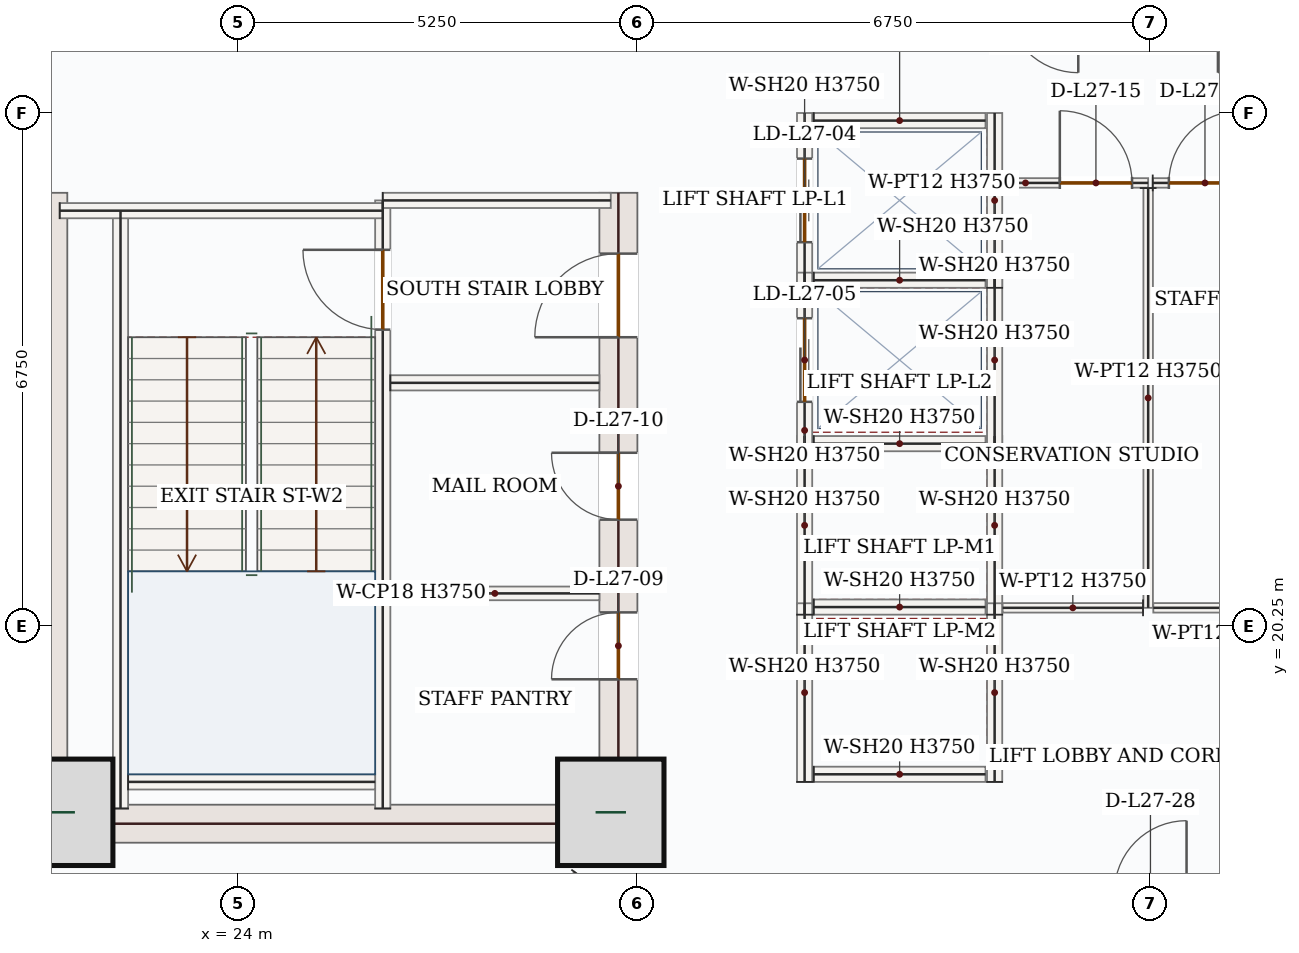
"""IFC4 building model, lengths in metres.
Left out: names, types, materials, properties, quantities, classifications, styles, units other than length and angle.
Written with IfcOpenShell. Run it as: python <this file> out.ifc"""

import sys

from ifc_helpers import new_model, si_unit, direction, frame, frame_2d, origin, origin_2d, place, context, subcontext, project, spatial, rectangle, extrude, source, transform, mapped, element, fill, save


model = new_model("IFC4")
c1 = context("Model", 3, precision=1e-05, world=origin(), true_north=direction((0.0, 1.0)))
c2 = subcontext(c1, "Body", "Model", "MODEL_VIEW")
j1 = project(units=[si_unit("LENGTHUNIT", "METRE"), si_unit("PLANEANGLEUNIT", "RADIAN")], contexts=[c1])
p1 = place(None, origin())
s1 = spatial("IfcSite", under=j1, at=p1, CompositionType="ELEMENT")
p2 = place(p1, origin())
s2 = spatial("IfcBuilding", under=s1, at=p2, CompositionType="ELEMENT")
p3 = place(p2, frame((0.0, 0.0, 121.5)))
s3 = spatial("IfcBuildingStorey", under=s2, at=p3, CompositionType="ELEMENT", Elevation=121.5)
m1 = source(origin(), c2, "Body", "SweptSolid", [
    extrude(rectangle(XDim=8.55, YDim=0.5, at=frame_2d((4.275, 0.0))), origin(), (0.0, 0.0, 1.0), 3.75),
])
p4 = place(p3, frame((21.5, 17.4, 0.0), z_axis=(0.0, 0.0, 1.0), x_axis=(0.0, 1.0, 0.0)))
e1 = element("IfcWall", 1, at=p4, inside=s3, PredefinedType="SHEAR", context=c2, shape_type="MappedRepresentation", body=[
    mapped(m1, transform((0.0, 0.0, 0.0), x_axis=(1.0, 0.0, 0.0), y_axis=(0.0, 1.0, 0.0), z_axis=(0.0, 0.0, 1.0), scale=1.0)),
])
p5 = place(p3, frame((29.0, 17.4, 0.0), z_axis=(0.0, 0.0, 1.0), x_axis=(0.0, 1.0, 0.0)))
e2 = element("IfcWall", 2, at=p5, inside=s3, PredefinedType="SHEAR", context=c2, shape_type="SweptSolid", body=[
    extrude(rectangle(XDim=8.55, YDim=0.5, at=frame_2d((4.275, 0.0))), origin(), (0.0, 0.0, 1.0), 3.75),
])
p6 = place(p5, frame((6.65, 0.0, 0.0)))
e3 = element("IfcOpeningElement", 3, at=p6, cuts=e2, PredefinedType="OPENING", context=c2, shape_type="SweptSolid", body=[
    extrude(rectangle(XDim=1.1, YDim=2.2, at=frame_2d((0.55, 1.1))), frame((0.0, 0.26, 0.0), z_axis=(0.0, -1.0, 0.0), x_axis=(1.0, 0.0, 0.0)), (0.0, 0.0, 1.0), 0.52),
])
p7 = place(p5, frame((2.15, 0.0, 0.0)))
e4 = element("IfcOpeningElement", 4, at=p7, cuts=e2, PredefinedType="OPENING", context=c2, shape_type="SweptSolid", body=[
    extrude(rectangle(XDim=0.88, YDim=2.1, at=frame_2d((0.44, 1.05))), frame((0.0, 0.26, 0.0), z_axis=(0.0, -1.0, 0.0), x_axis=(1.0, 0.0, 0.0)), (0.0, 0.0, 1.0), 0.52),
])
p8 = place(p5, frame((4.25, 0.0, 0.0)))
e5 = element("IfcOpeningElement", 5, at=p8, cuts=e2, PredefinedType="OPENING", context=c2, shape_type="SweptSolid", body=[
    extrude(rectangle(XDim=0.88, YDim=2.1, at=frame_2d((0.44, 1.05))), frame((0.0, 0.26, 0.0), z_axis=(0.0, -1.0, 0.0), x_axis=(1.0, 0.0, 0.0)), (0.0, 0.0, 1.0), 0.52),
])
m2 = source(origin(), c2, "Body", "SweptSolid", [
    extrude(rectangle(XDim=7.0, YDim=0.5, at=frame_2d((3.5, 0.0))), origin(), (0.0, 0.0, 1.0), 3.75),
])
p9 = place(p3, frame((21.75, 17.65, 0.0), z_axis=(0.0, 0.0, 1.0), x_axis=(1.0, 0.0, 0.0)))
e6 = element("IfcWall", 6, at=p9, inside=s3, PredefinedType="SHEAR", context=c2, shape_type="MappedRepresentation", body=[
    mapped(m2, transform((0.0, 0.0, 0.0), x_axis=(1.0, 0.0, 0.0), y_axis=(0.0, 1.0, 0.0), z_axis=(0.0, 0.0, 1.0), scale=1.0)),
])
m3 = source(origin(), c2, "Body", "SweptSolid", [
    extrude(rectangle(XDim=1.4, YDim=1.4, at=origin_2d()), origin(), (0.0, 0.0, 1.0), 4.2),
])
for number, where, z_axis, x_axis in (
    (7, (21.65, 17.8, 0.0), (0.0, 0.0, 1.0), (1.0, 0.0, 0.0)),
    (8, (28.9, 17.8, 0.0), (0.0, 0.0, 1.0), (1.0, 0.0, 0.0)),
):
    element("IfcColumn", number, at=place(p3, frame(where, z_axis=z_axis, x_axis=x_axis)), inside=s3, PredefinedType="COLUMN", context=c2, shape_type="MappedRepresentation", body=[
        mapped(m3, transform((0.0, 0.0, 0.0), x_axis=(1.0, 0.0, 0.0), y_axis=(0.0, 1.0, 0.0), z_axis=(0.0, 0.0, 1.0), scale=1.0)),
    ])
p10 = place(p3, frame((22.658, 14.74, 0.0), z_axis=(0.0, 0.0, 1.0), x_axis=(-0.707106781187, 0.707106781187, 0.0)))
e9 = element("IfcWall", 9, at=p10, inside=s3, PredefinedType="SOLIDWALL", context=c2, shape_type="SweptSolid", body=[
    extrude(rectangle(XDim=4.545, YDim=0.32, at=frame_2d((2.272, 0.0))), origin(), (0.0, 0.0, 1.0), 3.75),
])
p11 = place(p10, frame((1.073, 0.0, 0.85)))
e10 = element("IfcOpeningElement", 10, at=p11, cuts=e9, PredefinedType="OPENING", context=c2, shape_type="SweptSolid", body=[
    extrude(rectangle(XDim=2.4, YDim=1.8, at=frame_2d((1.2, 0.9))), frame((0.0, 0.17, 0.0), z_axis=(0.0, -1.0, 0.0), x_axis=(1.0, 0.0, 0.0)), (0.0, 0.0, 1.0), 0.34),
])
m4 = source(origin(), c2, "Body", "SweptSolid", [
    extrude(rectangle(XDim=7.87, YDim=0.2, at=frame_2d((3.935, 0.0))), origin(), (0.0, 0.0, 1.0), 3.75),
])
p12 = place(p3, frame((22.45, 17.85, 0.0), z_axis=(0.0, 0.0, 1.0), x_axis=(0.0, 1.0, 0.0)))
e11 = element("IfcWall", 11, at=p12, inside=s3, PredefinedType="SOLIDWALL", context=c2, shape_type="MappedRepresentation", body=[
    mapped(m4, transform((0.0, 0.0, 0.0), x_axis=(1.0, 0.0, 0.0), y_axis=(0.0, 1.0, 0.0), z_axis=(0.0, 0.0, 1.0), scale=1.0)),
])
p13 = place(p3, frame((25.9, 17.85, 0.0), z_axis=(0.0, 0.0, 1.0), x_axis=(0.0, 1.0, 0.0)))
e12 = element("IfcWall", 12, at=p13, inside=s3, PredefinedType="SOLIDWALL", context=c2, shape_type="SweptSolid", body=[
    extrude(rectangle(XDim=8.0, YDim=0.2, at=frame_2d((4.0, 0.0))), origin(), (0.0, 0.0, 1.0), 3.75),
])
p14 = place(p13, frame((6.3, 0.0, 0.0)))
e13 = element("IfcOpeningElement", 13, at=p14, cuts=e12, PredefinedType="OPENING", context=c2, shape_type="SweptSolid", body=[
    extrude(rectangle(XDim=1.05, YDim=2.15, at=frame_2d((0.525, 1.075))), frame((0.0, 0.11, 0.0), z_axis=(0.0, -1.0, 0.0), x_axis=(1.0, 0.0, 0.0)), (0.0, 0.0, 1.0), 0.22),
])
m5 = source(origin(), c2, "Body", "SweptSolid", [
    extrude(rectangle(XDim=4.25, YDim=0.2, at=frame_2d((2.125, 0.0))), origin(), (0.0, 0.0, 1.0), 3.75),
])
p15 = place(p3, frame((21.65, 25.715, 0.0), z_axis=(0.0, 0.0, 1.0), x_axis=(1.0, 0.0, 0.0)))
e14 = element("IfcWall", 14, at=p15, inside=s3, PredefinedType="SOLIDWALL", context=c2, shape_type="MappedRepresentation", body=[
    mapped(m5, transform((0.0, 0.0, 0.0), x_axis=(1.0, 0.0, 0.0), y_axis=(0.0, 1.0, 0.0), z_axis=(0.0, 0.0, 1.0), scale=1.0)),
])
m6 = source(origin(), c2, "Body", "SweptSolid", [
    extrude(rectangle(XDim=3.0, YDim=0.2, at=frame_2d((1.5, 0.0))), origin(), (0.0, 0.0, 1.0), 3.75),
])
p16 = place(p3, frame((25.9, 25.85, 0.0), z_axis=(0.0, 0.0, 1.0), x_axis=(1.0, 0.0, 0.0)))
e15 = element("IfcWall", 15, at=p16, inside=s3, PredefinedType="SOLIDWALL", context=c2, shape_type="MappedRepresentation", body=[
    mapped(m6, transform((0.0, 0.0, 0.0), x_axis=(1.0, 0.0, 0.0), y_axis=(0.0, 1.0, 0.0), z_axis=(0.0, 0.0, 1.0), scale=1.0)),
])
m7 = source(origin(), c2, "Body", "SweptSolid", [
    extrude(rectangle(XDim=3.25, YDim=0.2, at=frame_2d((1.625, 0.0))), origin(), (0.0, 0.0, 1.0), 3.75),
])
p17 = place(p3, frame((22.55, 18.2, 0.0), z_axis=(0.0, 0.0, 1.0), x_axis=(1.0, 0.0, 0.0)))
e16 = element("IfcWall", 16, at=p17, inside=s3, PredefinedType="SOLIDWALL", context=c2, shape_type="MappedRepresentation", body=[
    mapped(m7, transform((0.0, 0.0, 0.0), x_axis=(1.0, 0.0, 0.0), y_axis=(0.0, 1.0, 0.0), z_axis=(0.0, 0.0, 1.0), scale=1.0)),
])
m8 = source(origin(), c2, "Body", "SweptSolid", [
    extrude(rectangle(XDim=2.75, YDim=0.2, at=frame_2d((1.375, 0.0))), origin(), (0.0, 0.0, 1.0), 3.75),
])
p18 = place(p3, frame((26.0, 23.45, 0.0), z_axis=(0.0, 0.0, 1.0), x_axis=(1.0, 0.0, 0.0)))
e17 = element("IfcWall", 17, at=p18, inside=s3, PredefinedType="SOLIDWALL", context=c2, shape_type="MappedRepresentation", body=[
    mapped(m8, transform((0.0, 0.0, 0.0), x_axis=(1.0, 0.0, 0.0), y_axis=(0.0, 1.0, 0.0), z_axis=(0.0, 0.0, 1.0), scale=1.0)),
])
m9 = source(origin(), c2, "Body", "SweptSolid", [
    extrude(rectangle(XDim=2.75, YDim=0.18, at=frame_2d((1.375, 0.0))), origin(), (0.0, 0.0, 1.0), 3.75),
])
p19 = place(p3, frame((26.0, 20.68, 0.0), z_axis=(0.0, 0.0, 1.0), x_axis=(1.0, 0.0, 0.0)))
e18 = element("IfcWall", 18, at=p19, inside=s3, PredefinedType="PARTITIONING", context=c2, shape_type="MappedRepresentation", body=[
    mapped(m9, transform((0.0, 0.0, 0.0), x_axis=(1.0, 0.0, 0.0), y_axis=(0.0, 1.0, 0.0), z_axis=(0.0, 0.0, 1.0), scale=1.0)),
])
m10 = source(origin(), c2, "Body", "SweptSolid", [
    extrude(rectangle(XDim=2.35, YDim=0.2, at=frame_2d((1.175, 0.0))), origin(), (0.0, 0.0, 1.0), 3.75),
])
for number, where, z_axis, x_axis in (
    (19, (31.45, 20.4, 0.0), (0.0, 0.0, 1.0), (0.0, 1.0, 0.0)),
    (20, (33.95, 20.4, 0.0), (0.0, 0.0, 1.0), (0.0, 1.0, 0.0)),
):
    element("IfcWall", number, at=place(p3, frame(where, z_axis=z_axis, x_axis=x_axis)), inside=s3, PredefinedType="SOLIDWALL", context=c2, shape_type="MappedRepresentation", body=[
        mapped(m10, transform((0.0, 0.0, 0.0), x_axis=(1.0, 0.0, 0.0), y_axis=(0.0, 1.0, 0.0), z_axis=(0.0, 0.0, 1.0), scale=1.0)),
    ])
m11 = source(origin(), c2, "Body", "SweptSolid", [
    extrude(rectangle(XDim=2.26, YDim=0.2, at=frame_2d((1.13, 0.0))), origin(), (0.0, 0.0, 1.0), 3.75),
])
for number, where, z_axis, x_axis in (
    (21, (31.57, 20.5, 0.0), (0.0, 0.0, 1.0), (1.0, 0.0, 0.0)),
    (22, (31.57, 22.65, 0.0), (0.0, 0.0, 1.0), (1.0, 0.0, 0.0)),
):
    element("IfcWall", number, at=place(p3, frame(where, z_axis=z_axis, x_axis=x_axis)), inside=s3, PredefinedType="SOLIDWALL", context=c2, shape_type="MappedRepresentation", body=[
        mapped(m11, transform((0.0, 0.0, 0.0), x_axis=(1.0, 0.0, 0.0), y_axis=(0.0, 1.0, 0.0), z_axis=(0.0, 0.0, 1.0), scale=1.0)),
    ])
for number, where, z_axis, x_axis in (
    (23, (31.45, 18.2, 0.0), (0.0, 0.0, 1.0), (0.0, 1.0, 0.0)),
    (24, (33.95, 18.2, 0.0), (0.0, 0.0, 1.0), (0.0, 1.0, 0.0)),
):
    element("IfcWall", number, at=place(p3, frame(where, z_axis=z_axis, x_axis=x_axis)), inside=s3, PredefinedType="SOLIDWALL", context=c2, shape_type="MappedRepresentation", body=[
        mapped(m10, transform((0.0, 0.0, 0.0), x_axis=(1.0, 0.0, 0.0), y_axis=(0.0, 1.0, 0.0), z_axis=(0.0, 0.0, 1.0), scale=1.0)),
    ])
p20 = place(p3, frame((31.57, 18.3, 0.0), z_axis=(0.0, 0.0, 1.0), x_axis=(1.0, 0.0, 0.0)))
e25 = element("IfcWall", 25, at=p20, inside=s3, PredefinedType="SOLIDWALL", context=c2, shape_type="MappedRepresentation", body=[
    mapped(m11, transform((0.0, 0.0, 0.0), x_axis=(1.0, 0.0, 0.0), y_axis=(0.0, 1.0, 0.0), z_axis=(0.0, 0.0, 1.0), scale=1.0)),
])
p21 = place(p3, frame((31.45, 24.7, 0.0), z_axis=(0.0, 0.0, 1.0), x_axis=(0.0, 1.0, 0.0)))
e26 = element("IfcWall", 26, at=p21, inside=s3, PredefinedType="SOLIDWALL", context=c2, shape_type="SweptSolid", body=[
    extrude(rectangle(XDim=2.3, YDim=0.2, at=frame_2d((1.15, 0.0))), origin(), (0.0, 0.0, 1.0), 3.75),
])
p22 = place(p21, frame((0.6, 0.0, 0.0)))
e27 = element("IfcOpeningElement", 27, at=p22, cuts=e26, PredefinedType="OPENING", context=c2, shape_type="SweptSolid", body=[
    extrude(rectangle(XDim=1.1, YDim=2.15, at=frame_2d((0.55, 1.075))), frame((0.0, 0.11, 0.0), z_axis=(0.0, -1.0, 0.0), x_axis=(1.0, 0.0, 0.0)), (0.0, 0.0, 1.0), 0.22),
])
m12 = source(origin(), c2, "Body", "SweptSolid", [
    extrude(rectangle(XDim=2.3, YDim=0.2, at=frame_2d((1.15, 0.0))), origin(), (0.0, 0.0, 1.0), 3.75),
])
p23 = place(p3, frame((33.95, 24.7, 0.0), z_axis=(0.0, 0.0, 1.0), x_axis=(0.0, 1.0, 0.0)))
e28 = element("IfcWall", 28, at=p23, inside=s3, PredefinedType="SOLIDWALL", context=c2, shape_type="MappedRepresentation", body=[
    mapped(m12, transform((0.0, 0.0, 0.0), x_axis=(1.0, 0.0, 0.0), y_axis=(0.0, 1.0, 0.0), z_axis=(0.0, 0.0, 1.0), scale=1.0)),
])
for number, where, z_axis, x_axis in (
    (29, (31.57, 24.8, 0.0), (0.0, 0.0, 1.0), (1.0, 0.0, 0.0)),
    (30, (31.57, 26.9, 0.0), (0.0, 0.0, 1.0), (1.0, 0.0, 0.0)),
):
    element("IfcWall", number, at=place(p3, frame(where, z_axis=z_axis, x_axis=x_axis)), inside=s3, PredefinedType="SOLIDWALL", context=c2, shape_type="MappedRepresentation", body=[
        mapped(m11, transform((0.0, 0.0, 0.0), x_axis=(1.0, 0.0, 0.0), y_axis=(0.0, 1.0, 0.0), z_axis=(0.0, 0.0, 1.0), scale=1.0)),
    ])
p24 = place(p3, frame((31.45, 22.6, 0.0), z_axis=(0.0, 0.0, 1.0), x_axis=(0.0, 1.0, 0.0)))
e31 = element("IfcWall", 31, at=p24, inside=s3, PredefinedType="SOLIDWALL", context=c2, shape_type="SweptSolid", body=[
    extrude(rectangle(XDim=2.3, YDim=0.2, at=frame_2d((1.15, 0.0))), origin(), (0.0, 0.0, 1.0), 3.75),
])
p25 = place(p24, frame((0.6, 0.0, 0.0)))
e32 = element("IfcOpeningElement", 32, at=p25, cuts=e31, PredefinedType="OPENING", context=c2, shape_type="SweptSolid", body=[
    extrude(rectangle(XDim=1.1, YDim=2.15, at=frame_2d((0.55, 1.075))), frame((0.0, 0.11, 0.0), z_axis=(0.0, -1.0, 0.0), x_axis=(1.0, 0.0, 0.0)), (0.0, 0.0, 1.0), 0.22),
])
m13 = source(origin(), c2, "Body", "SweptSolid", [
    extrude(rectangle(XDim=2.3, YDim=0.2, at=frame_2d((1.15, 0.0))), origin(), (0.0, 0.0, 1.0), 3.75),
])
p26 = place(p3, frame((33.95, 22.6, 0.0), z_axis=(0.0, 0.0, 1.0), x_axis=(0.0, 1.0, 0.0)))
e33 = element("IfcWall", 33, at=p26, inside=s3, PredefinedType="SOLIDWALL", context=c2, shape_type="MappedRepresentation", body=[
    mapped(m13, transform((0.0, 0.0, 0.0), x_axis=(1.0, 0.0, 0.0), y_axis=(0.0, 1.0, 0.0), z_axis=(0.0, 0.0, 1.0), scale=1.0)),
])
p27 = place(p3, frame((34.055, 26.08, 0.0), z_axis=(0.0, 0.0, 1.0), x_axis=(1.0, 0.0, 0.0)))
e34 = element("IfcWall", 34, at=p27, inside=s3, PredefinedType="PARTITIONING", context=c2, shape_type="SweptSolid", body=[
    extrude(rectangle(XDim=1.915, YDim=0.125, at=frame_2d((0.958, 0.0))), origin(), (0.0, 0.0, 1.0), 3.75),
])
p28 = place(p27, frame((0.753, 0.0, 0.0)))
e35 = element("IfcOpeningElement", 35, at=p28, cuts=e34, PredefinedType="OPENING", context=c2, shape_type="SweptSolid", body=[
    extrude(rectangle(XDim=0.95, YDim=2.15, at=frame_2d((0.475, 1.075))), frame((0.0, 0.073, 0.0), z_axis=(0.0, -1.0, 0.0), x_axis=(1.0, 0.0, 0.0)), (0.0, 0.0, 1.0), 0.145),
])
m14 = source(origin(), c2, "Body", "SweptSolid", [
    extrude(rectangle(XDim=5.522, YDim=0.125, at=frame_2d((2.761, 0.0))), origin(), (0.0, 0.0, 1.0), 3.75),
])
p29 = place(p3, frame((35.97, 26.012, 0.0), z_axis=(0.0, 0.0, 1.0), x_axis=(0.0, -1.0, 0.0)))
e36 = element("IfcWall", 36, at=p29, inside=s3, PredefinedType="PARTITIONING", context=c2, shape_type="MappedRepresentation", body=[
    mapped(m14, transform((0.0, 0.0, 0.0), x_axis=(1.0, 0.0, 0.0), y_axis=(0.0, 1.0, 0.0), z_axis=(0.0, 0.0, 1.0), scale=1.0)),
])
m15 = source(origin(), c2, "Body", "SweptSolid", [
    extrude(rectangle(XDim=1.848, YDim=0.125, at=frame_2d((0.924, 0.0))), origin(), (0.0, 0.0, 1.0), 3.75),
])
p30 = place(p3, frame((35.903, 20.49, 0.0), z_axis=(0.0, 0.0, 1.0), x_axis=(-1.0, 0.0, 0.0)))
e37 = element("IfcWall", 37, at=p30, inside=s3, PredefinedType="PARTITIONING", context=c2, shape_type="MappedRepresentation", body=[
    mapped(m15, transform((0.0, 0.0, 0.0), x_axis=(1.0, 0.0, 0.0), y_axis=(0.0, 1.0, 0.0), z_axis=(0.0, 0.0, 1.0), scale=1.0)),
])
p31 = place(p3, frame((36.03, 26.08, 0.0), z_axis=(0.0, 0.0, 1.0), x_axis=(1.0, 0.0, 0.0)))
e38 = element("IfcWall", 38, at=p31, inside=s3, PredefinedType="PARTITIONING", context=c2, shape_type="SweptSolid", body=[
    extrude(rectangle(XDim=1.915, YDim=0.125, at=frame_2d((0.958, 0.0))), origin(), (0.0, 0.0, 1.0), 3.75),
])
p32 = place(p31, frame((0.212, 0.0, 0.0)))
e39 = element("IfcOpeningElement", 39, at=p32, cuts=e38, PredefinedType="OPENING", context=c2, shape_type="SweptSolid", body=[
    extrude(rectangle(XDim=0.95, YDim=2.15, at=frame_2d((0.475, 1.075))), frame((0.0, 0.073, 0.0), z_axis=(0.0, -1.0, 0.0), x_axis=(1.0, 0.0, 0.0)), (0.0, 0.0, 1.0), 0.145),
])
m16 = source(origin(), c2, "Body", "SweptSolid", [
    extrude(rectangle(XDim=1.907, YDim=0.125, at=frame_2d((0.954, 0.0))), origin(), (0.0, 0.0, 1.0), 3.75),
])
p33 = place(p3, frame((37.945, 20.49, 0.0), z_axis=(0.0, 0.0, 1.0), x_axis=(-1.0, 0.0, 0.0)))
e40 = element("IfcWall", 40, at=p33, inside=s3, PredefinedType="PARTITIONING", context=c2, shape_type="MappedRepresentation", body=[
    mapped(m16, transform((0.0, 0.0, 0.0), x_axis=(1.0, 0.0, 0.0), y_axis=(0.0, 1.0, 0.0), z_axis=(0.0, 0.0, 1.0), scale=1.0)),
])
m17 = source(origin(), c2, "Body", "SweptSolid", [
    extrude(rectangle(XDim=2.59, YDim=0.125, at=frame_2d((1.295, 0.0))), origin(), (0.0, 0.0, 1.0), 3.75),
])
p34 = place(p3, frame((28.47, 16.98, 0.0), z_axis=(0.0, 0.0, 1.0), x_axis=(-0.598354601134, -0.801231409333, 0.0)))
e41 = element("IfcWall", 41, at=p34, inside=s3, PredefinedType="PARTITIONING", context=c2, shape_type="MappedRepresentation", body=[
    mapped(m17, transform((0.0, 0.0, 0.0), x_axis=(1.0, 0.0, 0.0), y_axis=(0.0, 1.0, 0.0), z_axis=(0.0, 0.0, 1.0), scale=1.0)),
])
m18 = source(origin(), c2, "Body", "SweptSolid", [
    extrude(rectangle(XDim=2.4, YDim=1.8, at=frame_2d((1.2, 0.9))), frame((0.0, 0.03, 0.0), z_axis=(0.0, -1.0, 0.0), x_axis=(1.0, 0.0, 0.0)), (0.0, 0.0, 1.0), 0.06),
])
p35 = place(p11, origin())
e42 = element("IfcWindow", 42, at=p35, inside=s3, PartitioningType="DOUBLE_PANEL_VERTICAL", PredefinedType="WINDOW", context=c2, shape_type="MappedRepresentation", body=[
    mapped(m18, transform((0.0, 0.0, 0.0), x_axis=(1.0, 0.0, 0.0), y_axis=(0.0, 1.0, 0.0), z_axis=(0.0, 0.0, 1.0), scale=1.0)),
])
fill(e10, e42)
m19 = source(origin(), c2, "Body", "SweptSolid", [
    extrude(rectangle(XDim=1.05, YDim=2.15, at=frame_2d((0.525, 1.075))), frame((0.0, 0.025, 0.0), z_axis=(0.0, -1.0, 0.0), x_axis=(1.0, 0.0, 0.0)), (0.0, 0.0, 1.0), 0.05),
])
p36 = place(p14, origin())
e43 = element("IfcDoor", 43, at=p36, inside=s3, OperationType="SINGLE_SWING_RIGHT", PredefinedType="DOOR", context=c2, shape_type="MappedRepresentation", body=[
    mapped(m19, transform((0.0, 0.0, 0.0), x_axis=(1.0, 0.0, 0.0), y_axis=(0.0, 1.0, 0.0), z_axis=(0.0, 0.0, 1.0), scale=1.0)),
])
fill(e13, e43)
m20 = source(origin(), c2, "Body", "SweptSolid", [
    extrude(rectangle(XDim=1.1, YDim=2.2, at=frame_2d((0.55, 1.1))), frame((0.0, 0.025, 0.0), z_axis=(0.0, -1.0, 0.0), x_axis=(1.0, 0.0, 0.0)), (0.0, 0.0, 1.0), 0.05),
])
p37 = place(p6, origin())
e44 = element("IfcDoor", 44, at=p37, inside=s3, OperationType="SINGLE_SWING_LEFT", PredefinedType="DOOR", context=c2, shape_type="MappedRepresentation", body=[
    mapped(m20, transform((0.0, 0.0, 0.0), x_axis=(1.0, 0.0, 0.0), y_axis=(0.0, 1.0, 0.0), z_axis=(0.0, 0.0, 1.0), scale=1.0)),
])
fill(e3, e44)
m21 = source(origin(), c2, "Body", "SweptSolid", [
    extrude(rectangle(XDim=0.88, YDim=2.1, at=frame_2d((0.44, 1.05))), frame((0.0, 0.025, 0.0), z_axis=(0.0, -1.0, 0.0), x_axis=(1.0, 0.0, 0.0)), (0.0, 0.0, 1.0), 0.05),
])
p38 = place(p7, origin())
e45 = element("IfcDoor", 45, at=p38, inside=s3, OperationType="SINGLE_SWING_LEFT", PredefinedType="DOOR", context=c2, shape_type="MappedRepresentation", body=[
    mapped(m21, transform((0.0, 0.0, 0.0), x_axis=(1.0, 0.0, 0.0), y_axis=(0.0, 1.0, 0.0), z_axis=(0.0, 0.0, 1.0), scale=1.0)),
])
fill(e4, e45)
p39 = place(p8, origin())
e46 = element("IfcDoor", 46, at=p39, inside=s3, OperationType="SINGLE_SWING_RIGHT", PredefinedType="DOOR", context=c2, shape_type="MappedRepresentation", body=[
    mapped(m21, transform((0.0, 0.0, 0.0), x_axis=(1.0, 0.0, 0.0), y_axis=(0.0, 1.0, 0.0), z_axis=(0.0, 0.0, 1.0), scale=1.0)),
])
fill(e5, e46)
m22 = source(origin(), c2, "Body", "SweptSolid", [
    extrude(rectangle(XDim=1.1, YDim=2.15, at=frame_2d((0.55, 1.075))), frame((0.0, 0.025, 0.0), z_axis=(0.0, -1.0, 0.0), x_axis=(1.0, 0.0, 0.0)), (0.0, 0.0, 1.0), 0.05),
])
p40 = place(p22, origin())
e47 = element("IfcDoor", 47, at=p40, inside=s3, OperationType="DOUBLE_DOOR_SLIDING", PredefinedType="DOOR", context=c2, shape_type="MappedRepresentation", body=[
    mapped(m22, transform((0.0, 0.0, 0.0), x_axis=(1.0, 0.0, 0.0), y_axis=(0.0, 1.0, 0.0), z_axis=(0.0, 0.0, 1.0), scale=1.0)),
])
fill(e27, e47)
p41 = place(p25, origin())
e48 = element("IfcDoor", 48, at=p41, inside=s3, OperationType="DOUBLE_DOOR_SLIDING", PredefinedType="DOOR", context=c2, shape_type="MappedRepresentation", body=[
    mapped(m22, transform((0.0, 0.0, 0.0), x_axis=(1.0, 0.0, 0.0), y_axis=(0.0, 1.0, 0.0), z_axis=(0.0, 0.0, 1.0), scale=1.0)),
])
fill(e32, e48)
m23 = source(origin(), c2, "Body", "SweptSolid", [
    extrude(rectangle(XDim=0.95, YDim=2.15, at=frame_2d((0.475, 1.075))), frame((0.0, 0.025, 0.0), z_axis=(0.0, -1.0, 0.0), x_axis=(1.0, 0.0, 0.0)), (0.0, 0.0, 1.0), 0.05),
])
p42 = place(p28, origin())
e49 = element("IfcDoor", 49, at=p42, inside=s3, OperationType="SINGLE_SWING_LEFT", PredefinedType="DOOR", context=c2, shape_type="MappedRepresentation", body=[
    mapped(m23, transform((0.0, 0.0, 0.0), x_axis=(1.0, 0.0, 0.0), y_axis=(0.0, 1.0, 0.0), z_axis=(0.0, 0.0, 1.0), scale=1.0)),
])
fill(e35, e49)
p43 = place(p32, origin())
e50 = element("IfcDoor", 50, at=p43, inside=s3, OperationType="SINGLE_SWING_RIGHT", PredefinedType="DOOR", context=c2, shape_type="MappedRepresentation", body=[
    mapped(m23, transform((0.0, 0.0, 0.0), x_axis=(1.0, 0.0, 0.0), y_axis=(0.0, 1.0, 0.0), z_axis=(0.0, 0.0, 1.0), scale=1.0)),
])
fill(e39, e50)
save(model, sys.argv[1])
